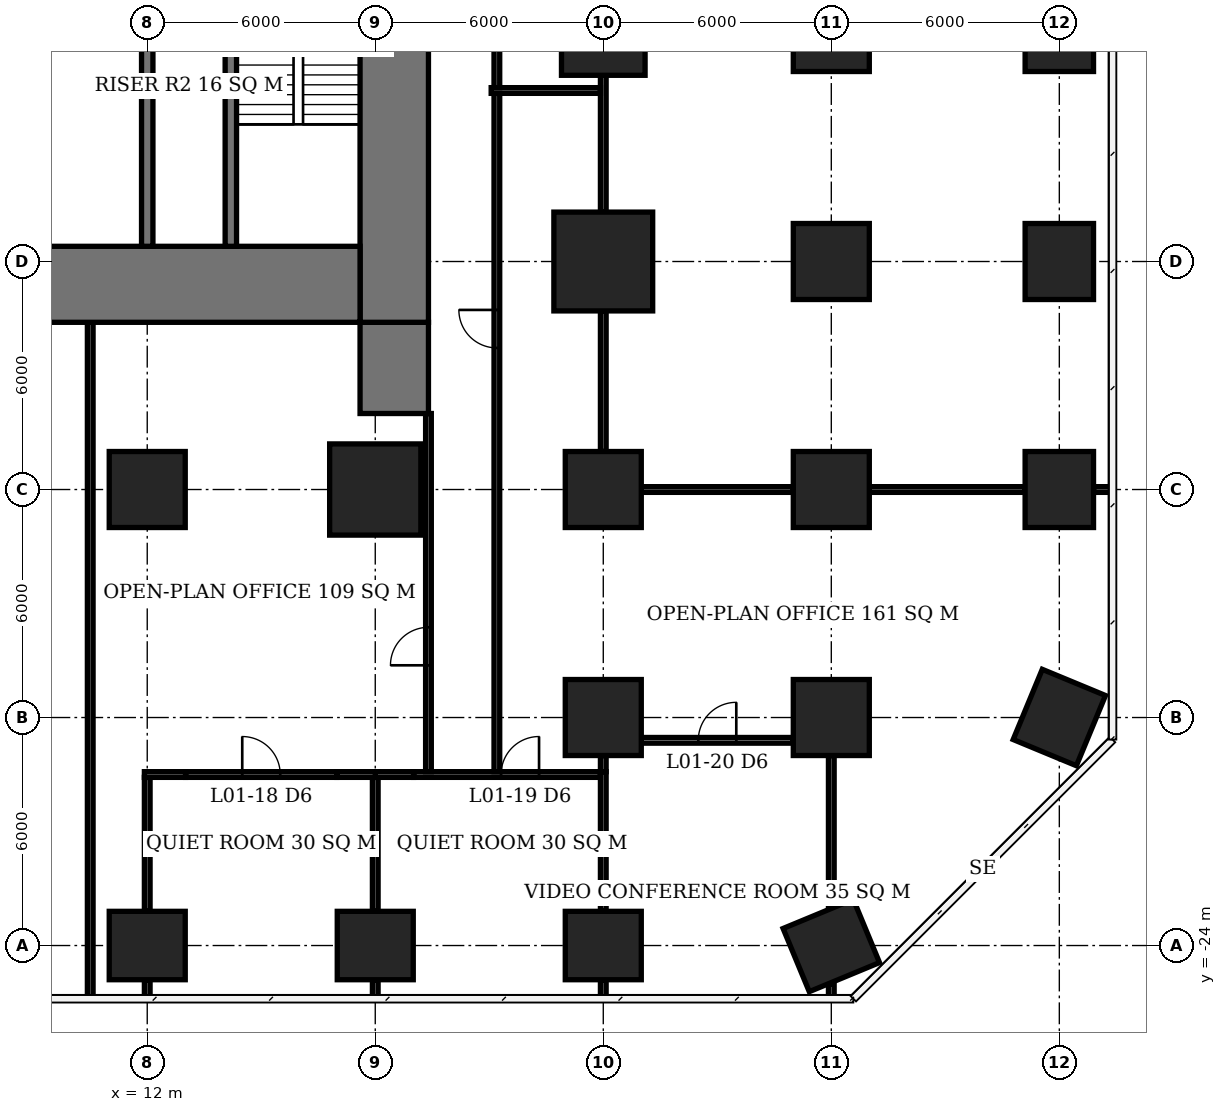
"""IFC4 building model, lengths in metres.
Left out: names, types, materials, properties, quantities, classifications, styles, units other than length and angle.
Written with IfcOpenShell. Run it as: python <this file> out.ifc"""

import sys

from ifc_helpers import new_model, si_unit, direction, frame, frame_2d, origin, origin_2d, place, context, subcontext, project, spatial, rectangle, extrude, element, fill, save


model = new_model("IFC4")
c1 = context("Model", 3, precision=1e-05, world=origin(), true_north=direction((0.0, 1.0)))
c2 = subcontext(c1, "Body", "Model", "MODEL_VIEW")
j1 = project(units=[si_unit("LENGTHUNIT", "METRE"), si_unit("PLANEANGLEUNIT", "RADIAN")], contexts=[c1])
p1 = place(None, origin())
s1 = spatial("IfcSite", under=j1, at=p1, CompositionType="ELEMENT")
p2 = place(p1, origin())
s2 = spatial("IfcBuilding", under=s1, at=p2, CompositionType="ELEMENT")
p3 = place(p2, frame((0.0, 0.0, 6.0)))
s3 = spatial("IfcBuildingStorey", under=s2, at=p3, CompositionType="ELEMENT", Elevation=6.0)
p4 = place(p3, frame((12.0, -24.0, 0.0), z_axis=(0.0, 0.0, 1.0), x_axis=(1.0, 0.0, 0.0)))
e1 = element("IfcColumn", 1, at=p4, inside=s3, PredefinedType="COLUMN", context=c2, shape_type="SweptSolid", body=[
    extrude(rectangle(XDim=2.0, YDim=1.8, at=origin_2d()), origin(), (0.0, 0.0, 1.0), 5.0),
])
p5 = place(p3, frame((12.0, -12.0, 0.0), z_axis=(0.0, 0.0, 1.0), x_axis=(1.0, 0.0, 0.0)))
e2 = element("IfcColumn", 2, at=p5, inside=s3, PredefinedType="COLUMN", context=c2, shape_type="SweptSolid", body=[
    extrude(rectangle(XDim=2.0, YDim=2.0, at=origin_2d()), origin(), (0.0, 0.0, 1.0), 5.0),
])
p6 = place(p3, frame((18.0, -24.0, 0.0), z_axis=(0.0, 0.0, 1.0), x_axis=(1.0, 0.0, 0.0)))
e3 = element("IfcColumn", 3, at=p6, inside=s3, PredefinedType="COLUMN", context=c2, shape_type="SweptSolid", body=[
    extrude(rectangle(XDim=2.0, YDim=1.8, at=origin_2d()), origin(), (0.0, 0.0, 1.0), 5.0),
])
p7 = place(p3, frame((18.0, -12.0, 0.0), z_axis=(0.0, 0.0, 1.0), x_axis=(1.0, 0.0, 0.0)))
e4 = element("IfcColumn", 4, at=p7, inside=s3, PredefinedType="COLUMN", context=c2, shape_type="SweptSolid", body=[
    extrude(rectangle(XDim=2.4, YDim=2.4, at=origin_2d()), origin(), (0.0, 0.0, 1.0), 5.0),
])
p8 = place(p3, frame((24.0, -24.0, 0.0), z_axis=(0.0, 0.0, 1.0), x_axis=(1.0, 0.0, 0.0)))
e5 = element("IfcColumn", 5, at=p8, inside=s3, PredefinedType="COLUMN", context=c2, shape_type="SweptSolid", body=[
    extrude(rectangle(XDim=2.0, YDim=1.8, at=origin_2d()), origin(), (0.0, 0.0, 1.0), 5.0),
])
for number, where, z_axis, x_axis in (
    (6, (24.0, -18.0, 0.0), (0.0, 0.0, 1.0), (1.0, 0.0, 0.0)),
    (7, (24.0, -12.0, 0.0), (0.0, 0.0, 1.0), (1.0, 0.0, 0.0)),
):
    element("IfcColumn", number, at=place(p3, frame(where, z_axis=z_axis, x_axis=x_axis)), inside=s3, PredefinedType="COLUMN", context=c2, shape_type="SweptSolid", body=[
        extrude(rectangle(XDim=2.0, YDim=2.0, at=origin_2d()), origin(), (0.0, 0.0, 1.0), 5.0),
    ])
p9 = place(p3, frame((24.0, -6.0, 0.0), z_axis=(0.0, 0.0, 1.0), x_axis=(1.0, 0.0, 0.0)))
e8 = element("IfcColumn", 8, at=p9, inside=s3, PredefinedType="COLUMN", context=c2, shape_type="SweptSolid", body=[
    extrude(rectangle(XDim=2.6, YDim=2.6, at=origin_2d()), origin(), (0.0, 0.0, 1.0), 5.0),
])
p10 = place(p3, frame((24.0, 0.0, 0.0), z_axis=(0.0, 0.0, 1.0), x_axis=(1.0, 0.0, 0.0)))
e9 = element("IfcColumn", 9, at=p10, inside=s3, PredefinedType="COLUMN", context=c2, shape_type="SweptSolid", body=[
    extrude(rectangle(XDim=2.2, YDim=2.2, at=origin_2d()), origin(), (0.0, 0.0, 1.0), 5.0),
])
p11 = place(p3, frame((30.0, -24.0, 0.0), z_axis=(0.0, 0.0, 1.0), x_axis=(-0.923879532511, -0.382683432365, 0.0)))
e10 = element("IfcColumn", 10, at=p11, inside=s3, PredefinedType="COLUMN", context=c2, shape_type="SweptSolid", body=[
    extrude(rectangle(XDim=2.0, YDim=1.8, at=origin_2d()), origin(), (0.0, 0.0, 1.0), 5.0),
])
for number, where, z_axis, x_axis in (
    (11, (30.0, -18.0, 0.0), (0.0, 0.0, 1.0), (1.0, 0.0, 0.0)),
    (12, (30.0, -12.0, 0.0), (0.0, 0.0, 1.0), (1.0, 0.0, 0.0)),
    (13, (30.0, -6.0, 0.0), (0.0, 0.0, 1.0), (1.0, 0.0, 0.0)),
    (14, (30.0, 0.0, 0.0), (0.0, 0.0, 1.0), (1.0, 0.0, 0.0)),
):
    element("IfcColumn", number, at=place(p3, frame(where, z_axis=z_axis, x_axis=x_axis)), inside=s3, PredefinedType="COLUMN", context=c2, shape_type="SweptSolid", body=[
        extrude(rectangle(XDim=2.0, YDim=2.0, at=origin_2d()), origin(), (0.0, 0.0, 1.0), 5.0),
    ])
for number, where, z_axis, x_axis in (
    (15, (36.0, -18.0, 0.0), (0.0, 0.0, 1.0), (-0.383, -0.924, 0.0)),
    (16, (36.0, -12.0, 0.0), (0.0, 0.0, 1.0), (0.0, 1.0, 0.0)),
    (17, (36.0, -6.0, 0.0), (0.0, 0.0, 1.0), (0.0, 1.0, 0.0)),
    (18, (36.0, 0.0, 0.0), (0.0, 0.0, 1.0), (0.0, 1.0, 0.0)),
):
    element("IfcColumn", number, at=place(p3, frame(where, z_axis=z_axis, x_axis=x_axis)), inside=s3, PredefinedType="COLUMN", context=c2, shape_type="SweptSolid", body=[
        extrude(rectangle(XDim=2.0, YDim=1.8, at=origin_2d()), origin(), (0.0, 0.0, 1.0), 5.0),
    ])
p12 = place(p3, frame((-5.6, -6.6, 0.0), z_axis=(0.0, 0.0, 1.0), x_axis=(1.0, 0.0, 0.0)))
e19 = element("IfcWall", 19, at=p12, inside=s3, PredefinedType="SHEAR", context=c2, shape_type="SweptSolid", body=[
    extrude(rectangle(XDim=23.2, YDim=2.0, at=frame_2d((11.6, 0.0))), origin(), (0.0, 0.0, 1.0), 5.0),
])
p13 = place(p3, frame((18.5, -7.6, 0.0), z_axis=(0.0, 0.0, 1.0), x_axis=(0.0, 1.0, 0.0)))
e20 = element("IfcWall", 20, at=p13, inside=s3, PredefinedType="SHEAR", context=c2, shape_type="SweptSolid", body=[
    extrude(rectangle(XDim=21.2, YDim=1.8, at=frame_2d((10.6, 0.0))), origin(), (0.0, 0.0, 1.0), 5.0),
])
p14 = place(p13, frame((9.2, 0.0, 0.0)))
e21 = element("IfcOpeningElement", 21, at=p14, cuts=e20, PredefinedType="OPENING", context=c2, shape_type="SweptSolid", body=[
    extrude(rectangle(XDim=1.8, YDim=2.4, at=frame_2d((0.9, 1.2))), frame((0.0, 0.91, 0.0), z_axis=(0.0, -1.0, 0.0), x_axis=(1.0, 0.0, 0.0)), (0.0, 0.0, 1.0), 1.82),
])
p15 = place(p3, frame((18.5, -10.0, 0.0), z_axis=(0.0, 0.0, 1.0), x_axis=(0.0, 1.0, 0.0)))
e22 = element("IfcWall", 22, at=p15, inside=s3, PredefinedType="SHEAR", context=c2, shape_type="SweptSolid", body=[
    extrude(rectangle(XDim=2.4, YDim=1.8, at=frame_2d((1.2, 0.0))), origin(), (0.0, 0.0, 1.0), 5.0),
])
p16 = place(p3, frame((12.0, -5.6, 0.0), z_axis=(0.0, 0.0, 1.0), x_axis=(0.0, 1.0, 0.0)))
e23 = element("IfcWall", 23, at=p16, inside=s3, PredefinedType="SHEAR", context=c2, shape_type="SweptSolid", body=[
    extrude(rectangle(XDim=5.45, YDim=0.3, at=frame_2d((2.725, 0.0))), origin(), (0.0, 0.0, 1.0), 5.0),
])
p17 = place(p3, frame((14.2, -5.6, 0.0), z_axis=(0.0, 0.0, 1.0), x_axis=(0.0, 1.0, 0.0)))
e24 = element("IfcWall", 24, at=p17, inside=s3, PredefinedType="SHEAR", context=c2, shape_type="SweptSolid", body=[
    extrude(rectangle(XDim=8.45, YDim=0.3, at=frame_2d((4.225, 0.0))), origin(), (0.0, 0.0, 1.0), 5.0),
])
p18 = place(p3, frame((11.925, -19.5, 0.0), z_axis=(0.0, 0.0, 1.0), x_axis=(1.0, 0.0, 0.0)))
e25 = element("IfcWall", 25, at=p18, inside=s3, PredefinedType="PARTITIONING", context=c2, shape_type="SweptSolid", body=[
    extrude(rectangle(XDim=1.085, YDim=0.15, at=frame_2d((0.542, 0.0))), origin(), (0.0, 0.0, 1.0), 3.75),
])
p19 = place(p3, frame((13.01, -19.5, 0.0), z_axis=(0.0, 0.0, 1.0), x_axis=(1.0, 0.0, 0.0)))
e26 = element("IfcWall", 26, at=p19, inside=s3, PredefinedType="PARTITIONING", context=c2, shape_type="SweptSolid", body=[
    extrude(rectangle(XDim=3.98, YDim=0.15, at=frame_2d((1.99, 0.0))), origin(), (0.0, 0.0, 1.0), 4.75),
])
p20 = place(p19, frame((1.49, 0.0, 0.0)))
e27 = element("IfcOpeningElement", 27, at=p20, cuts=e26, PredefinedType="OPENING", context=c2, shape_type="SweptSolid", body=[
    extrude(rectangle(XDim=1.0, YDim=2.1, at=frame_2d((0.5, 1.05))), frame((0.0, 0.085, 0.0), z_axis=(0.0, -1.0, 0.0), x_axis=(1.0, 0.0, 0.0)), (0.0, 0.0, 1.0), 0.17),
])
p21 = place(p3, frame((16.99, -19.5, 0.0), z_axis=(0.0, 0.0, 1.0), x_axis=(1.0, 0.0, 0.0)))
e28 = element("IfcWall", 28, at=p21, inside=s3, PredefinedType="PARTITIONING", context=c2, shape_type="SweptSolid", body=[
    extrude(rectangle(XDim=1.085, YDim=0.15, at=frame_2d((0.542, 0.0))), origin(), (0.0, 0.0, 1.0), 3.75),
])
p22 = place(p3, frame((18.0, -19.5, 0.0), z_axis=(0.0, 0.0, 1.0), x_axis=(1.0, 0.0, 0.0)))
e29 = element("IfcWall", 29, at=p22, inside=s3, PredefinedType="PARTITIONING", context=c2, shape_type="SweptSolid", body=[
    extrude(rectangle(XDim=1.01, YDim=0.15, at=frame_2d((0.505, 0.0))), origin(), (0.0, 0.0, 1.0), 3.75),
])
p23 = place(p3, frame((19.01, -19.5, 0.0), z_axis=(0.0, 0.0, 1.0), x_axis=(1.0, 0.0, 0.0)))
e30 = element("IfcWall", 30, at=p23, inside=s3, PredefinedType="PARTITIONING", context=c2, shape_type="SweptSolid", body=[
    extrude(rectangle(XDim=4.915, YDim=0.15, at=frame_2d((2.458, 0.0))), origin(), (0.0, 0.0, 1.0), 4.75),
])
p24 = place(p23, frame((2.3, 0.0, 0.0)))
e31 = element("IfcOpeningElement", 31, at=p24, cuts=e30, PredefinedType="OPENING", context=c2, shape_type="SweptSolid", body=[
    extrude(rectangle(XDim=1.0, YDim=2.1, at=frame_2d((0.5, 1.05))), frame((0.0, 0.085, 0.0), z_axis=(0.0, -1.0, 0.0), x_axis=(1.0, 0.0, 0.0)), (0.0, 0.0, 1.0), 0.17),
])
p25 = place(p3, frame((25.0, -18.6, 0.0), z_axis=(0.0, 0.0, 1.0), x_axis=(1.0, 0.0, 0.0)))
e32 = element("IfcWall", 32, at=p25, inside=s3, PredefinedType="PARTITIONING", context=c2, shape_type="SweptSolid", body=[
    extrude(rectangle(XDim=4.0, YDim=0.15, at=frame_2d((2.0, 0.0))), origin(), (0.0, 0.0, 1.0), 4.75),
])
p26 = place(p25, frame((1.5, 0.0, 0.0)))
e33 = element("IfcOpeningElement", 33, at=p26, cuts=e32, PredefinedType="OPENING", context=c2, shape_type="SweptSolid", body=[
    extrude(rectangle(XDim=1.0, YDim=2.1, at=frame_2d((0.5, 1.05))), frame((0.0, 0.085, 0.0), z_axis=(0.0, -1.0, 0.0), x_axis=(1.0, 0.0, 0.0)), (0.0, 0.0, 1.0), 0.17),
])
p27 = place(p3, frame((25.0, -12.0, 0.0), z_axis=(0.0, 0.0, 1.0), x_axis=(1.0, 0.0, 0.0)))
e34 = element("IfcWall", 34, at=p27, inside=s3, PredefinedType="PARTITIONING", context=c2, shape_type="SweptSolid", body=[
    extrude(rectangle(XDim=4.0, YDim=0.15, at=frame_2d((2.0, 0.0))), origin(), (0.0, 0.0, 1.0), 4.75),
])
p28 = place(p3, frame((31.0, -12.0, 0.0), z_axis=(0.0, 0.0, 1.0), x_axis=(1.0, 0.0, 0.0)))
e35 = element("IfcWall", 35, at=p28, inside=s3, PredefinedType="PARTITIONING", context=c2, shape_type="SweptSolid", body=[
    extrude(rectangle(XDim=4.1, YDim=0.15, at=frame_2d((2.05, 0.0))), origin(), (0.0, 0.0, 1.0), 4.75),
])
for number, where, z_axis, x_axis in (
    (36, (36.9, -12.0, 0.0), (0.0, 0.0, 1.0), (1.0, 0.0, 0.0)),
    (37, (12.0, -25.375, 0.0), (0.0, 0.0, 1.0), (0.0, 1.0, 0.0)),
):
    element("IfcWall", number, at=place(p3, frame(where, z_axis=z_axis, x_axis=x_axis)), inside=s3, PredefinedType="PARTITIONING", context=c2, shape_type="SweptSolid", body=[
        extrude(rectangle(XDim=0.475, YDim=0.15, at=frame_2d((0.238, 0.0))), origin(), (0.0, 0.0, 1.0), 4.75),
    ])
p29 = place(p3, frame((12.0, -23.1, 0.0), z_axis=(0.0, 0.0, 1.0), x_axis=(0.0, 1.0, 0.0)))
e38 = element("IfcWall", 38, at=p29, inside=s3, PredefinedType="PARTITIONING", context=c2, shape_type="SweptSolid", body=[
    extrude(rectangle(XDim=3.525, YDim=0.15, at=frame_2d((1.763, 0.0))), origin(), (0.0, 0.0, 1.0), 3.75),
])
p30 = place(p3, frame((18.0, -25.375, 0.0), z_axis=(0.0, 0.0, 1.0), x_axis=(0.0, 1.0, 0.0)))
e39 = element("IfcWall", 39, at=p30, inside=s3, PredefinedType="PARTITIONING", context=c2, shape_type="SweptSolid", body=[
    extrude(rectangle(XDim=0.475, YDim=0.15, at=frame_2d((0.238, 0.0))), origin(), (0.0, 0.0, 1.0), 4.75),
])
p31 = place(p3, frame((18.0, -23.1, 0.0), z_axis=(0.0, 0.0, 1.0), x_axis=(0.0, 1.0, 0.0)))
e40 = element("IfcWall", 40, at=p31, inside=s3, PredefinedType="PARTITIONING", context=c2, shape_type="SweptSolid", body=[
    extrude(rectangle(XDim=3.525, YDim=0.15, at=frame_2d((1.763, 0.0))), origin(), (0.0, 0.0, 1.0), 3.75),
])
p32 = place(p3, frame((24.0, -25.375, 0.0), z_axis=(0.0, 0.0, 1.0), x_axis=(0.0, 1.0, 0.0)))
e41 = element("IfcWall", 41, at=p32, inside=s3, PredefinedType="PARTITIONING", context=c2, shape_type="SweptSolid", body=[
    extrude(rectangle(XDim=0.475, YDim=0.15, at=frame_2d((0.238, 0.0))), origin(), (0.0, 0.0, 1.0), 4.75),
])
p33 = place(p3, frame((24.0, -23.1, 0.0), z_axis=(0.0, 0.0, 1.0), x_axis=(0.0, 1.0, 0.0)))
e42 = element("IfcWall", 42, at=p33, inside=s3, PredefinedType="PARTITIONING", context=c2, shape_type="SweptSolid", body=[
    extrude(rectangle(XDim=3.675, YDim=0.15, at=frame_2d((1.837, 0.0))), origin(), (0.0, 0.0, 1.0), 4.75),
])
p34 = place(p3, frame((24.0, -19.425, 0.0), z_axis=(0.0, 0.0, 1.0), x_axis=(0.0, 1.0, 0.0)))
e43 = element("IfcWall", 43, at=p34, inside=s3, PredefinedType="PARTITIONING", context=c2, shape_type="SweptSolid", body=[
    extrude(rectangle(XDim=0.425, YDim=0.15, at=frame_2d((0.212, 0.0))), origin(), (0.0, 0.0, 1.0), 4.75),
])
p35 = place(p3, frame((24.0, -11.0, 0.0), z_axis=(0.0, 0.0, 1.0), x_axis=(0.0, 1.0, 0.0)))
e44 = element("IfcWall", 44, at=p35, inside=s3, PredefinedType="PARTITIONING", context=c2, shape_type="SweptSolid", body=[
    extrude(rectangle(XDim=3.7, YDim=0.15, at=frame_2d((1.85, 0.0))), origin(), (0.0, 0.0, 1.0), 4.75),
])
p36 = place(p3, frame((24.0, -4.7, 0.0), z_axis=(0.0, 0.0, 1.0), x_axis=(0.0, 1.0, 0.0)))
e45 = element("IfcWall", 45, at=p36, inside=s3, PredefinedType="PARTITIONING", context=c2, shape_type="SweptSolid", body=[
    extrude(rectangle(XDim=3.6, YDim=0.15, at=frame_2d((1.8, 0.0))), origin(), (0.0, 0.0, 1.0), 4.75),
])
p37 = place(p3, frame((30.0, -25.375, 0.0), z_axis=(0.0, 0.0, 1.0), x_axis=(0.0, 1.0, 0.0)))
e46 = element("IfcWall", 46, at=p37, inside=s3, PredefinedType="PARTITIONING", context=c2, shape_type="SweptSolid", body=[
    extrude(rectangle(XDim=0.37, YDim=0.15, at=frame_2d((0.185, 0.0))), origin(), (0.0, 0.0, 1.0), 4.75),
])
p38 = place(p3, frame((30.0, -22.995, 0.0), z_axis=(0.0, 0.0, 1.0), x_axis=(0.0, 1.0, 0.0)))
e47 = element("IfcWall", 47, at=p38, inside=s3, PredefinedType="PARTITIONING", context=c2, shape_type="SweptSolid", body=[
    extrude(rectangle(XDim=3.995, YDim=0.15, at=frame_2d((1.998, 0.0))), origin(), (0.0, 0.0, 1.0), 4.75),
])
p39 = place(p3, frame((10.5, -25.375, 0.0), z_axis=(0.0, 0.0, 1.0), x_axis=(0.0, 1.0, 0.0)))
e48 = element("IfcWall", 48, at=p39, inside=s3, PredefinedType="PARTITIONING", context=c2, shape_type="SweptSolid", body=[
    extrude(rectangle(XDim=17.775, YDim=0.15, at=frame_2d((8.887, 0.0))), origin(), (0.0, 0.0, 1.0), 4.75),
])
p40 = place(p3, frame((19.4, -19.425, 0.0), z_axis=(0.0, 0.0, 1.0), x_axis=(0.0, 1.0, 0.0)))
e49 = element("IfcWall", 49, at=p40, inside=s3, PredefinedType="PARTITIONING", context=c2, shape_type="SweptSolid", body=[
    extrude(rectangle(XDim=9.425, YDim=0.15, at=frame_2d((4.712, 0.0))), origin(), (0.0, 0.0, 1.0), 4.75),
])
p41 = place(p40, frame((2.799, 0.0, 0.0)))
e50 = element("IfcOpeningElement", 50, at=p41, cuts=e49, PredefinedType="OPENING", context=c2, shape_type="SweptSolid", body=[
    extrude(rectangle(XDim=1.0, YDim=2.1, at=frame_2d((0.5, 1.05))), frame((0.0, 0.085, 0.0), z_axis=(0.0, -1.0, 0.0), x_axis=(1.0, 0.0, 0.0)), (0.0, 0.0, 1.0), 0.17),
])
p42 = place(p3, frame((21.2, -19.425, 0.0), z_axis=(0.0, 0.0, 1.0), x_axis=(0.0, 1.0, 0.0)))
e51 = element("IfcWall", 51, at=p42, inside=s3, PredefinedType="PARTITIONING", context=c2, shape_type="SweptSolid", body=[
    extrude(rectangle(XDim=17.85, YDim=0.15, at=frame_2d((8.925, 0.0))), origin(), (0.0, 0.0, 1.0), 4.75),
])
p43 = place(p42, frame((11.151, 0.0, 0.0)))
e52 = element("IfcOpeningElement", 52, at=p43, cuts=e51, PredefinedType="OPENING", context=c2, shape_type="SweptSolid", body=[
    extrude(rectangle(XDim=1.0, YDim=2.1, at=frame_2d((0.5, 1.05))), frame((0.0, 0.085, 0.0), z_axis=(0.0, -1.0, 0.0), x_axis=(1.0, 0.0, 0.0)), (0.0, 0.0, 1.0), 0.17),
])
p44 = place(p3, frame((21.2, -1.425, 0.0), z_axis=(0.0, 0.0, 1.0), x_axis=(0.0, 1.0, 0.0)))
e53 = element("IfcWall", 53, at=p44, inside=s3, PredefinedType="PARTITIONING", context=c2, shape_type="SweptSolid", body=[
    extrude(rectangle(XDim=20.85, YDim=0.15, at=frame_2d((10.425, 0.0))), origin(), (0.0, 0.0, 1.0), 4.75),
])
p45 = place(p44, frame((13.075, 0.0, 0.0)))
e54 = element("IfcOpeningElement", 54, at=p45, cuts=e53, PredefinedType="OPENING", context=c2, shape_type="SweptSolid", body=[
    extrude(rectangle(XDim=1.0, YDim=2.1, at=frame_2d((0.5, 1.05))), frame((0.0, 0.085, 0.0), z_axis=(0.0, -1.0, 0.0), x_axis=(1.0, 0.0, 0.0)), (0.0, 0.0, 1.0), 0.17),
])
p46 = place(p3, frame((21.05, -1.5, 0.0), z_axis=(0.0, 0.0, 1.0), x_axis=(1.0, 0.0, 0.0)))
e55 = element("IfcWall", 55, at=p46, inside=s3, PredefinedType="PARTITIONING", context=c2, shape_type="SweptSolid", body=[
    extrude(rectangle(XDim=2.875, YDim=0.15, at=frame_2d((1.438, 0.0))), origin(), (0.0, 0.0, 1.0), 4.75),
])
p47 = place(p20, origin())
e56 = element("IfcDoor", 56, at=p47, inside=s3, OperationType="SINGLE_SWING_LEFT", PredefinedType="DOOR", context=c2, shape_type="SweptSolid", body=[
    extrude(rectangle(XDim=1.0, YDim=2.1, at=frame_2d((0.5, 1.05))), frame((0.0, 0.025, 0.0), z_axis=(0.0, -1.0, 0.0), x_axis=(1.0, 0.0, 0.0)), (0.0, 0.0, 1.0), 0.05),
])
fill(e27, e56)
p48 = place(p24, origin())
e57 = element("IfcDoor", 57, at=p48, inside=s3, OperationType="SINGLE_SWING_RIGHT", PredefinedType="DOOR", context=c2, shape_type="SweptSolid", body=[
    extrude(rectangle(XDim=1.0, YDim=2.1, at=frame_2d((0.5, 1.05))), frame((0.0, 0.025, 0.0), z_axis=(0.0, -1.0, 0.0), x_axis=(1.0, 0.0, 0.0)), (0.0, 0.0, 1.0), 0.05),
])
fill(e31, e57)
p49 = place(p26, origin())
e58 = element("IfcDoor", 58, at=p49, inside=s3, OperationType="SINGLE_SWING_RIGHT", PredefinedType="DOOR", context=c2, shape_type="SweptSolid", body=[
    extrude(rectangle(XDim=1.0, YDim=2.1, at=frame_2d((0.5, 1.05))), frame((0.0, 0.025, 0.0), z_axis=(0.0, -1.0, 0.0), x_axis=(1.0, 0.0, 0.0)), (0.0, 0.0, 1.0), 0.05),
])
fill(e33, e58)
p50 = place(p43, origin())
e59 = element("IfcDoor", 59, at=p50, inside=s3, OperationType="SINGLE_SWING_RIGHT", PredefinedType="DOOR", context=c2, shape_type="SweptSolid", body=[
    extrude(rectangle(XDim=1.0, YDim=2.1, at=frame_2d((0.5, 1.05))), frame((0.0, 0.025, 0.0), z_axis=(0.0, -1.0, 0.0), x_axis=(1.0, 0.0, 0.0)), (0.0, 0.0, 1.0), 0.05),
])
fill(e52, e59)
p51 = place(p41, origin())
e60 = element("IfcDoor", 60, at=p51, inside=s3, OperationType="SINGLE_SWING_LEFT", PredefinedType="DOOR", context=c2, shape_type="SweptSolid", body=[
    extrude(rectangle(XDim=1.0, YDim=2.1, at=frame_2d((0.5, 1.05))), frame((0.0, 0.025, 0.0), z_axis=(0.0, -1.0, 0.0), x_axis=(1.0, 0.0, 0.0)), (0.0, 0.0, 1.0), 0.05),
])
fill(e50, e60)
save(model, sys.argv[1])
